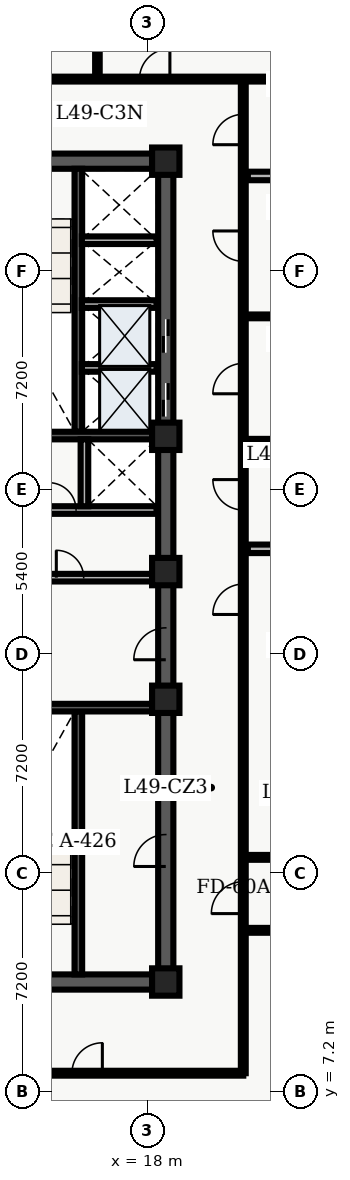
"""IFC4 building model, lengths in metres.
Left out: names, types, materials, properties, quantities, classifications, styles, units other than length and angle.
Written with IfcOpenShell. Run it as: python <this file> out.ifc"""

import sys

from ifc_helpers import new_model, entity, si_unit, converted_unit, direction, frame, origin_with_axes, origin_2d_with_axis, place, context, subcontext, project, spatial, polyline, rectangle, outline, extrude, element, fill, save


model = new_model("IFC4")
c1 = context("Model", 3, precision=1e-05, world=origin_with_axes(), true_north=direction((0.0, 1.0)))
c2 = subcontext(c1, "Body", "Model", "MODEL_VIEW")
j1 = project(units=[si_unit("LENGTHUNIT", "METRE"), converted_unit("PLANEANGLEUNIT", "DEGREE", entity("IfcPlaneAngleMeasure", 0.017), si_unit("PLANEANGLEUNIT", "RADIAN"), dimensions=[0, 0, 0, 0, 0, 0, 0])], contexts=[c1])
p1 = place(None, origin_with_axes())
s1 = spatial("IfcSite", under=j1, at=p1, CompositionType="ELEMENT")
p2 = place(p1, origin_with_axes())
s2 = spatial("IfcBuilding", under=s1, at=p2, CompositionType="ELEMENT")
p3 = place(p2, frame((0.0, 0.0, 200.4), z_axis=(0.0, 0.0, 1.0), x_axis=(1.0, 0.0, 0.0)))
s3 = spatial("IfcBuildingStorey", under=s2, at=p3, CompositionType="ELEMENT", Elevation=200.4)
p4 = place(p3, frame((11.4, 10.8, 0.0), z_axis=(0.0, 0.0, 1.0), x_axis=(1.0, 0.0, 0.0)))
e1 = element("IfcWall", 1, at=p4, inside=s3, PredefinedType="SHEAR", context=c2, shape_type="SweptSolid", body=[
    extrude(outline(polyline([(0.0, -0.25), (7.2, -0.25), (7.2, 0.25), (0.0, 0.25), (0.0, -0.25)])), origin_with_axes(), (0.0, 0.0, 1.0), 3.66),
])
p5 = place(p4, frame((2.625, 0.0, 0.0), z_axis=(0.0, 0.0, 1.0), x_axis=(1.0, 0.0, 0.0)))
e2 = element("IfcOpeningElement", 2, at=p5, cuts=e1, PredefinedType="OPENING", context=c2, shape_type="SweptSolid", body=[
    extrude(rectangle(XDim=1.05, YDim=0.52, at=origin_2d_with_axis()), origin_with_axes(), (0.0, 0.0, 1.0), 2.15),
])
p6 = place(p3, frame((11.4, 37.8, 0.0), z_axis=(0.0, 0.0, 1.0), x_axis=(1.0, 0.0, 0.0)))
e3 = element("IfcWall", 3, at=p6, inside=s3, PredefinedType="SHEAR", context=c2, shape_type="SweptSolid", body=[
    extrude(outline(polyline([(0.0, -0.25), (7.2, -0.25), (7.2, 0.25), (0.0, 0.25), (0.0, -0.25)])), origin_with_axes(), (0.0, 0.0, 1.0), 3.66),
])
p7 = place(p6, frame((2.625, 0.0, 0.0), z_axis=(0.0, 0.0, 1.0), x_axis=(1.0, 0.0, 0.0)))
e4 = element("IfcOpeningElement", 4, at=p7, cuts=e3, PredefinedType="OPENING", context=c2, shape_type="SweptSolid", body=[
    extrude(rectangle(XDim=1.05, YDim=0.52, at=origin_2d_with_axis()), origin_with_axes(), (0.0, 0.0, 1.0), 2.15),
])
p8 = place(p3, frame((18.6, 10.8, 0.0), z_axis=(0.0, 0.0, 1.0), x_axis=(0.0, 1.0, 0.0)))
e5 = element("IfcWall", 5, at=p8, inside=s3, PredefinedType="SHEAR", context=c2, shape_type="SweptSolid", body=[
    extrude(outline(polyline([(0.0, -0.25), (13.5, -0.25), (13.5, 0.25), (0.0, 0.25), (0.0, -0.25)])), origin_with_axes(), (0.0, 0.0, 1.0), 3.66),
])
p9 = place(p8, frame((11.125, 0.0, 0.0), z_axis=(0.0, 0.0, 1.0), x_axis=(1.0, 0.0, 0.0)))
e6 = element("IfcOpeningElement", 6, at=p9, cuts=e5, PredefinedType="OPENING", context=c2, shape_type="SweptSolid", body=[
    extrude(rectangle(XDim=1.05, YDim=0.52, at=origin_2d_with_axis()), origin_with_axes(), (0.0, 0.0, 1.0), 2.15),
])
p10 = place(p8, frame((4.325, 0.0, 0.0), z_axis=(0.0, 0.0, 1.0), x_axis=(1.0, 0.0, 0.0)))
e7 = element("IfcOpeningElement", 7, at=p10, cuts=e5, PredefinedType="OPENING", context=c2, shape_type="SweptSolid", body=[
    extrude(rectangle(XDim=1.05, YDim=0.52, at=origin_2d_with_axis()), origin_with_axes(), (0.0, 0.0, 1.0), 2.15),
])
p11 = place(p3, frame((18.6, 24.3, 0.0), z_axis=(0.0, 0.0, 1.0), x_axis=(0.0, 1.0, 0.0)))
e8 = element("IfcWall", 8, at=p11, inside=s3, PredefinedType="SHEAR", context=c2, shape_type="SweptSolid", body=[
    extrude(outline(polyline([(0.0, -0.25), (13.5, -0.25), (13.5, 0.25), (0.0, 0.25), (0.0, -0.25)])), origin_with_axes(), (0.0, 0.0, 1.0), 3.66),
])
p12 = place(p11, frame((5.65, 0.0, 0.0), z_axis=(0.0, 0.0, 1.0), x_axis=(1.0, 0.0, 0.0)))
e9 = element("IfcOpeningElement", 9, at=p12, cuts=e8, PredefinedType="OPENING", context=c2, shape_type="SweptSolid", body=[
    extrude(rectangle(XDim=1.1, YDim=0.52, at=origin_2d_with_axis()), origin_with_axes(), (0.0, 0.0, 1.0), 2.15),
])
p13 = place(p11, frame((7.75, 0.0, 0.0), z_axis=(0.0, 0.0, 1.0), x_axis=(1.0, 0.0, 0.0)))
e10 = element("IfcOpeningElement", 10, at=p13, cuts=e8, PredefinedType="OPENING", context=c2, shape_type="SweptSolid", body=[
    extrude(rectangle(XDim=1.1, YDim=0.52, at=origin_2d_with_axis()), origin_with_axes(), (0.0, 0.0, 1.0), 2.15),
])
p14 = place(p3, frame((15.725, 11.05, 0.0), z_axis=(0.0, 0.0, 1.0), x_axis=(0.0, 1.0, 0.0)))
e11 = element("IfcWall", 11, at=p14, inside=s3, PredefinedType="SHEAR", context=c2, shape_type="SweptSolid", body=[
    extrude(outline(polyline([(0.0, -0.125), (8.65, -0.125), (8.65, 0.125), (0.0, 0.125), (0.0, -0.125)])), origin_with_axes(), (0.0, 0.0, 1.0), 3.66),
])
p15 = place(p3, frame((11.65, 19.825, 0.0), z_axis=(0.0, 0.0, 1.0), x_axis=(1.0, 0.0, 0.0)))
e12 = element("IfcWall", 12, at=p15, inside=s3, PredefinedType="SHEAR", context=c2, shape_type="SweptSolid", body=[
    extrude(outline(polyline([(0.0, -0.125), (6.7, -0.125), (6.7, 0.125), (0.0, 0.125), (0.0, -0.125)])), origin_with_axes(), (0.0, 0.0, 1.0), 3.66),
])
p16 = place(p3, frame((15.725, 28.9, 0.0), z_axis=(0.0, 0.0, 1.0), x_axis=(0.0, 1.0, 0.0)))
e13 = element("IfcWall", 13, at=p16, inside=s3, PredefinedType="SHEAR", context=c2, shape_type="SweptSolid", body=[
    extrude(outline(polyline([(0.0, -0.125), (8.65, -0.125), (8.65, 0.125), (0.0, 0.125), (0.0, -0.125)])), origin_with_axes(), (0.0, 0.0, 1.0), 3.66),
])
p17 = place(p3, frame((11.65, 28.775, 0.0), z_axis=(0.0, 0.0, 1.0), x_axis=(1.0, 0.0, 0.0)))
e14 = element("IfcWall", 14, at=p17, inside=s3, PredefinedType="SHEAR", context=c2, shape_type="SweptSolid", body=[
    extrude(outline(polyline([(0.0, -0.125), (6.7, -0.125), (6.7, 0.125), (0.0, 0.125), (0.0, -0.125)])), origin_with_axes(), (0.0, 0.0, 1.0), 3.66),
])
p18 = place(p3, frame((11.7, 24.1, 0.0), z_axis=(0.0, 0.0, 1.0), x_axis=(1.0, 0.0, 0.0)))
e15 = element("IfcWall", 15, at=p18, inside=s3, PredefinedType="SOLIDWALL", context=c2, shape_type="SweptSolid", body=[
    extrude(outline(polyline([(0.0, -0.125), (6.6, -0.125), (6.6, 0.125), (0.0, 0.125), (0.0, -0.125)])), origin_with_axes(), (0.0, 0.0, 1.0), 2.7),
])
p19 = place(p18, frame((3.75, 0.0, 0.0), z_axis=(0.0, 0.0, 1.0), x_axis=(1.0, 0.0, 0.0)))
e16 = element("IfcOpeningElement", 16, at=p19, cuts=e15, PredefinedType="OPENING", context=c2, shape_type="SweptSolid", body=[
    extrude(rectangle(XDim=0.9, YDim=0.27, at=origin_2d_with_axis()), origin_with_axes(), (0.0, 0.0, 1.0), 2.15),
])
p20 = place(p3, frame((11.7, 26.325, 0.0), z_axis=(0.0, 0.0, 1.0), x_axis=(1.0, 0.0, 0.0)))
e17 = element("IfcWall", 17, at=p20, inside=s3, PredefinedType="SOLIDWALL", context=c2, shape_type="SweptSolid", body=[
    extrude(outline(polyline([(0.0, -0.125), (6.6, -0.125), (6.6, 0.125), (0.0, 0.125), (0.0, -0.125)])), origin_with_axes(), (0.0, 0.0, 1.0), 2.7),
])
p21 = place(p20, frame((3.5, 0.0, 0.0), z_axis=(0.0, 0.0, 1.0), x_axis=(1.0, 0.0, 0.0)))
e18 = element("IfcOpeningElement", 18, at=p21, cuts=e17, PredefinedType="OPENING", context=c2, shape_type="SweptSolid", body=[
    extrude(rectangle(XDim=0.9, YDim=0.27, at=origin_2d_with_axis()), origin_with_axes(), (0.0, 0.0, 1.0), 2.15),
])
p22 = place(p3, frame((15.925, 26.45, 0.0), z_axis=(0.0, 0.0, 1.0), x_axis=(0.0, 1.0, 0.0)))
e19 = element("IfcWall", 19, at=p22, inside=s3, PredefinedType="SOLIDWALL", context=c2, shape_type="SweptSolid", body=[
    extrude(outline(polyline([(0.0, -0.125), (2.2, -0.125), (2.2, 0.125), (0.0, 0.125), (0.0, -0.125)])), origin_with_axes(), (0.0, 0.0, 1.0), 2.7),
])
for number, where, z_axis, x_axis in (
    (20, (18.6, 10.8, 0.0), (0.0, 0.0, 1.0), (1.0, 0.0, 0.0)),
    (21, (18.6, 20.1, 0.0), (0.0, 0.0, 1.0), (1.0, 0.0, 0.0)),
    (22, (18.6, 24.3, 0.0), (0.0, 0.0, 1.0), (1.0, 0.0, 0.0)),
    (23, (18.6, 28.75, 0.0), (0.0, 0.0, 1.0), (1.0, 0.0, 0.0)),
    (24, (18.6, 37.8, 0.0), (0.0, 0.0, 1.0), (1.0, 0.0, 0.0)),
):
    element("IfcColumn", number, at=place(p3, frame(where, z_axis=z_axis, x_axis=x_axis)), inside=s3, PredefinedType="COLUMN", context=c2, shape_type="SweptSolid", body=[
        extrude(rectangle(XDim=0.9, YDim=0.9, at=origin_2d_with_axis()), origin_with_axes(), (0.0, 0.0, 1.0), 3.9),
    ])
for number, where, z_axis, x_axis in (
    (25, (15.84, 31.0, 0.0), (0.0, 0.0, 1.0), (1.0, 0.0, 0.0)),
    (26, (15.84, 33.1, 0.0), (0.0, 0.0, 1.0), (1.0, 0.0, 0.0)),
    (27, (15.84, 35.2, 0.0), (0.0, 0.0, 1.0), (1.0, 0.0, 0.0)),
):
    element("IfcWall", number, at=place(p3, frame(where, z_axis=z_axis, x_axis=x_axis)), inside=s3, PredefinedType="SOLIDWALL", context=c2, shape_type="SweptSolid", body=[
        extrude(outline(polyline([(0.0, -0.125), (2.46, -0.125), (2.46, 0.125), (0.0, 0.125), (0.0, -0.125)])), origin_with_axes(), (0.0, 0.0, 1.0), 2.7),
    ])
p23 = place(p3, frame((2.6, 7.8, 0.0), z_axis=(0.0, 0.0, 1.0), x_axis=(1.0, 0.0, 0.0)))
e28 = element("IfcWall", 28, at=p23, inside=s3, PredefinedType="PARTITIONING", context=c2, shape_type="SweptSolid", body=[
    extrude(outline(polyline([(0.0, -0.08), (18.55, -0.08), (18.55, 0.08), (0.0, 0.08), (0.0, -0.08)])), origin_with_axes(), (0.0, 0.0, 1.0), 2.7),
])
p24 = place(p23, frame((5.04, 0.0, 0.0), z_axis=(0.0, 0.0, 1.0), x_axis=(1.0, 0.0, 0.0)))
e29 = element("IfcOpeningElement", 29, at=p24, cuts=e28, PredefinedType="OPENING", context=c2, shape_type="SweptSolid", body=[
    extrude(rectangle(XDim=1.2, YDim=0.18, at=origin_2d_with_axis()), origin_with_axes(), (0.0, 0.0, 1.0), 2.2),
])
p25 = place(p23, frame((13.415, 0.0, 0.0), z_axis=(0.0, 0.0, 1.0), x_axis=(1.0, 0.0, 0.0)))
e30 = element("IfcOpeningElement", 30, at=p25, cuts=e28, PredefinedType="OPENING", context=c2, shape_type="SweptSolid", body=[
    extrude(rectangle(XDim=1.0, YDim=0.18, at=origin_2d_with_axis()), origin_with_axes(), (0.0, 0.0, 1.0), 2.15),
])
p26 = place(p3, frame((2.6, 40.5, 0.0), z_axis=(0.0, 0.0, 1.0), x_axis=(1.0, 0.0, 0.0)))
e31 = element("IfcWall", 31, at=p26, inside=s3, PredefinedType="PARTITIONING", context=c2, shape_type="SweptSolid", body=[
    extrude(outline(polyline([(0.0, -0.08), (26.177, -0.08), (26.177, 0.08), (0.0, 0.08), (0.0, -0.08)])), origin_with_axes(), (0.0, 0.0, 1.0), 2.7),
])
p27 = place(p26, frame((1.554, 0.0, 0.0), z_axis=(0.0, 0.0, 1.0), x_axis=(1.0, 0.0, 0.0)))
e32 = element("IfcOpeningElement", 32, at=p27, cuts=e31, PredefinedType="OPENING", context=c2, shape_type="SweptSolid", body=[
    extrude(rectangle(XDim=1.0, YDim=0.18, at=origin_2d_with_axis()), origin_with_axes(), (0.0, 0.0, 1.0), 2.15),
])
p28 = place(p26, frame((6.84, 0.0, 0.0), z_axis=(0.0, 0.0, 1.0), x_axis=(1.0, 0.0, 0.0)))
e33 = element("IfcOpeningElement", 33, at=p28, cuts=e31, PredefinedType="OPENING", context=c2, shape_type="SweptSolid", body=[
    extrude(rectangle(XDim=1.0, YDim=0.18, at=origin_2d_with_axis()), origin_with_axes(), (0.0, 0.0, 1.0), 2.15),
])
p29 = place(p26, frame((10.996, 0.0, 0.0), z_axis=(0.0, 0.0, 1.0), x_axis=(1.0, 0.0, 0.0)))
e34 = element("IfcOpeningElement", 34, at=p29, cuts=e31, PredefinedType="OPENING", context=c2, shape_type="SweptSolid", body=[
    extrude(rectangle(XDim=1.0, YDim=0.18, at=origin_2d_with_axis()), origin_with_axes(), (0.0, 0.0, 1.0), 2.15),
])
p30 = place(p26, frame((15.636, 0.0, 0.0), z_axis=(0.0, 0.0, 1.0), x_axis=(1.0, 0.0, 0.0)))
e35 = element("IfcOpeningElement", 35, at=p30, cuts=e31, PredefinedType="OPENING", context=c2, shape_type="SweptSolid", body=[
    extrude(rectangle(XDim=1.0, YDim=0.18, at=origin_2d_with_axis()), origin_with_axes(), (0.0, 0.0, 1.0), 2.15),
])
p31 = place(p3, frame((21.15, 7.8, 0.0), z_axis=(0.0, 0.0, 1.0), x_axis=(0.0, 1.0, 0.0)))
e36 = element("IfcWall", 36, at=p31, inside=s3, PredefinedType="PARTITIONING", context=c2, shape_type="SweptSolid", body=[
    extrude(outline(polyline([(0.0, -0.08), (32.7, -0.08), (32.7, 0.08), (0.0, 0.08), (0.0, -0.08)])), origin_with_axes(), (0.0, 0.0, 1.0), 2.7),
])
p32 = place(p31, frame((15.589, 0.0, 0.0), z_axis=(0.0, 0.0, 1.0), x_axis=(1.0, 0.0, 0.0)))
e37 = element("IfcOpeningElement", 37, at=p32, cuts=e36, PredefinedType="OPENING", context=c2, shape_type="SweptSolid", body=[
    extrude(rectangle(XDim=1.0, YDim=0.18, at=origin_2d_with_axis()), origin_with_axes(), (0.0, 0.0, 1.0), 2.15),
])
p33 = place(p31, frame((19.026, 0.0, 0.0), z_axis=(0.0, 0.0, 1.0), x_axis=(1.0, 0.0, 0.0)))
e38 = element("IfcOpeningElement", 38, at=p33, cuts=e36, PredefinedType="OPENING", context=c2, shape_type="SweptSolid", body=[
    extrude(rectangle(XDim=1.0, YDim=0.18, at=origin_2d_with_axis()), origin_with_axes(), (0.0, 0.0, 1.0), 2.15),
])
p34 = place(p31, frame((22.849, 0.0, 0.0), z_axis=(0.0, 0.0, 1.0), x_axis=(1.0, 0.0, 0.0)))
e39 = element("IfcOpeningElement", 39, at=p34, cuts=e36, PredefinedType="OPENING", context=c2, shape_type="SweptSolid", body=[
    extrude(rectangle(XDim=1.0, YDim=0.18, at=origin_2d_with_axis()), origin_with_axes(), (0.0, 0.0, 1.0), 2.15),
])
p35 = place(p31, frame((27.204, 0.0, 0.0), z_axis=(0.0, 0.0, 1.0), x_axis=(1.0, 0.0, 0.0)))
e40 = element("IfcOpeningElement", 40, at=p35, cuts=e36, PredefinedType="OPENING", context=c2, shape_type="SweptSolid", body=[
    extrude(rectangle(XDim=1.0, YDim=0.18, at=origin_2d_with_axis()), origin_with_axes(), (0.0, 0.0, 1.0), 2.15),
])
p36 = place(p31, frame((31.042, 0.0, 0.0), z_axis=(0.0, 0.0, 1.0), x_axis=(1.0, 0.0, 0.0)))
e41 = element("IfcOpeningElement", 41, at=p36, cuts=e36, PredefinedType="OPENING", context=c2, shape_type="SweptSolid", body=[
    extrude(rectangle(XDim=1.0, YDim=0.18, at=origin_2d_with_axis()), origin_with_axes(), (0.0, 0.0, 1.0), 2.15),
])
p37 = place(p31, frame((5.775, 0.0, 0.0), z_axis=(0.0, 0.0, 1.0), x_axis=(1.0, 0.0, 0.0)))
e42 = element("IfcOpeningElement", 42, at=p37, cuts=e36, PredefinedType="OPENING", context=c2, shape_type="SweptSolid", body=[
    extrude(rectangle(XDim=1.05, YDim=0.18, at=origin_2d_with_axis()), origin_with_axes(), (0.0, 0.0, 1.0), 2.15),
])
p38 = place(p3, frame((16.352, 40.6, 0.0), z_axis=(0.0, 0.0, 1.0), x_axis=(0.0, 1.0, 0.0)))
e43 = element("IfcWall", 43, at=p38, inside=s3, PredefinedType="PARTITIONING", context=c2, shape_type="SweptSolid", body=[
    extrude(outline(polyline([(0.0, -0.075), (7.665, -0.075), (7.665, 0.075), (0.0, 0.075), (0.0, -0.075)])), origin_with_axes(), (0.0, 0.0, 1.0), 2.7),
])
p39 = place(p3, frame((21.3, 25.049, 0.0), z_axis=(0.0, 0.0, 1.0), x_axis=(1.0, 0.0, 0.0)))
e44 = element("IfcWall", 44, at=p39, inside=s3, PredefinedType="PARTITIONING", context=c2, shape_type="SweptSolid", body=[
    extrude(outline(polyline([(0.0, -0.14), (7.477, -0.14), (7.477, 0.14), (0.0, 0.14), (0.0, -0.14)])), origin_with_axes(), (0.0, 0.0, 1.0), 2.7),
])
for number, where, z_axis, x_axis in (
    (45, (21.3, 28.603, 0.0), (0.0, 0.0, 1.0), (1.0, 0.0, 0.0)),
    (46, (21.3, 32.695, 0.0), (0.0, 0.0, 1.0), (1.0, 0.0, 0.0)),
):
    element("IfcWall", number, at=place(p3, frame(where, z_axis=z_axis, x_axis=x_axis)), inside=s3, PredefinedType="PARTITIONING", context=c2, shape_type="SweptSolid", body=[
        extrude(outline(polyline([(0.0, -0.062), (7.477, -0.062), (7.477, 0.062), (0.0, 0.062), (0.0, -0.062)])), origin_with_axes(), (0.0, 0.0, 1.0), 2.7),
    ])
p40 = place(p3, frame((21.3, 37.314, 0.0), z_axis=(0.0, 0.0, 1.0), x_axis=(1.0, 0.0, 0.0)))
e47 = element("IfcWall", 47, at=p40, inside=s3, PredefinedType="PARTITIONING", context=c2, shape_type="SweptSolid", body=[
    extrude(outline(polyline([(0.0, -0.14), (7.477, -0.14), (7.477, 0.14), (0.0, 0.14), (0.0, -0.14)])), origin_with_axes(), (0.0, 0.0, 1.0), 2.7),
])
p41 = place(p3, frame((21.15, 12.5, 0.0), z_axis=(0.0, 0.0, 1.0), x_axis=(1.0, 0.0, 0.0)))
e48 = element("IfcWall", 48, at=p41, inside=s3, PredefinedType="PARTITIONING", context=c2, shape_type="SweptSolid", body=[
    extrude(outline(polyline([(0.0, -0.08), (15.2, -0.08), (15.2, 0.08), (0.0, 0.08), (0.0, -0.08)])), origin_with_axes(), (0.0, 0.0, 1.0), 2.7),
])
p42 = place(p41, frame((1.758, 0.0, 0.0), z_axis=(0.0, 0.0, 1.0), x_axis=(1.0, 0.0, 0.0)))
e49 = element("IfcOpeningElement", 49, at=p42, cuts=e48, PredefinedType="OPENING", context=c2, shape_type="SweptSolid", body=[
    extrude(rectangle(XDim=1.0, YDim=0.18, at=origin_2d_with_axis()), origin_with_axes(), (0.0, 0.0, 1.0), 2.15),
])
p43 = place(p41, frame((4.893, 0.0, 0.0), z_axis=(0.0, 0.0, 1.0), x_axis=(1.0, 0.0, 0.0)))
e50 = element("IfcOpeningElement", 50, at=p43, cuts=e48, PredefinedType="OPENING", context=c2, shape_type="SweptSolid", body=[
    extrude(rectangle(XDim=1.0, YDim=0.18, at=origin_2d_with_axis()), origin_with_axes(), (0.0, 0.0, 1.0), 2.15),
])
p44 = place(p41, frame((8.555, 0.0, 0.0), z_axis=(0.0, 0.0, 1.0), x_axis=(1.0, 0.0, 0.0)))
e51 = element("IfcOpeningElement", 51, at=p44, cuts=e48, PredefinedType="OPENING", context=c2, shape_type="SweptSolid", body=[
    extrude(rectangle(XDim=1.0, YDim=0.18, at=origin_2d_with_axis()), origin_with_axes(), (0.0, 0.0, 1.0), 2.15),
])
p45 = place(p41, frame((12.889, 0.0, 0.0), z_axis=(0.0, 0.0, 1.0), x_axis=(1.0, 0.0, 0.0)))
e52 = element("IfcOpeningElement", 52, at=p45, cuts=e48, PredefinedType="OPENING", context=c2, shape_type="SweptSolid", body=[
    extrude(rectangle(XDim=1.0, YDim=0.18, at=origin_2d_with_axis()), origin_with_axes(), (0.0, 0.0, 1.0), 2.15),
])
p46 = place(p3, frame((21.15, 14.9, 0.0), z_axis=(0.0, 0.0, 1.0), x_axis=(1.0, 0.0, 0.0)))
e53 = element("IfcWall", 53, at=p46, inside=s3, PredefinedType="PARTITIONING", context=c2, shape_type="SweptSolid", body=[
    extrude(outline(polyline([(0.0, -0.08), (15.2, -0.08), (15.2, 0.08), (0.0, 0.08), (0.0, -0.08)])), origin_with_axes(), (0.0, 0.0, 1.0), 2.7),
])
p47 = place(p46, frame((7.65, 0.0, 0.0), z_axis=(0.0, 0.0, 1.0), x_axis=(1.0, 0.0, 0.0)))
e54 = element("IfcOpeningElement", 54, at=p47, cuts=e53, PredefinedType="OPENING", context=c2, shape_type="SweptSolid", body=[
    extrude(rectangle(XDim=1.0, YDim=0.18, at=origin_2d_with_axis()), origin_with_axes(), (0.0, 0.0, 1.0), 2.15),
])
p48 = place(p11, frame((5.65, 0.0, 0.0), z_axis=(0.0, 0.0, 1.0), x_axis=(1.0, 0.0, 0.0)))
e55 = element("IfcDoor", 55, at=p48, inside=s3, OperationType="SLIDING_TO_LEFT", PredefinedType="DOOR", context=c2, shape_type="SweptSolid", body=[
    extrude(rectangle(XDim=1.1, YDim=0.09, at=origin_2d_with_axis()), origin_with_axes(), (0.0, 0.0, 1.0), 2.15),
])
fill(e9, e55)
p49 = place(p11, frame((7.75, 0.0, 0.0), z_axis=(0.0, 0.0, 1.0), x_axis=(1.0, 0.0, 0.0)))
e56 = element("IfcDoor", 56, at=p49, inside=s3, OperationType="SLIDING_TO_RIGHT", PredefinedType="DOOR", context=c2, shape_type="SweptSolid", body=[
    extrude(rectangle(XDim=1.1, YDim=0.09, at=origin_2d_with_axis()), origin_with_axes(), (0.0, 0.0, 1.0), 2.15),
])
fill(e10, e56)
p50 = place(p8, frame((11.125, 0.0, 0.0), z_axis=(0.0, 0.0, 1.0), x_axis=(1.0, 0.0, 0.0)))
e57 = element("IfcDoor", 57, at=p50, inside=s3, OperationType="SINGLE_SWING_LEFT", PredefinedType="DOOR", context=c2, shape_type="SweptSolid", body=[
    extrude(rectangle(XDim=1.05, YDim=0.09, at=origin_2d_with_axis()), origin_with_axes(), (0.0, 0.0, 1.0), 2.15),
])
fill(e6, e57)
p51 = place(p18, frame((3.75, 0.0, 0.0), z_axis=(0.0, 0.0, 1.0), x_axis=(1.0, 0.0, 0.0)))
e58 = element("IfcDoor", 58, at=p51, inside=s3, OperationType="SINGLE_SWING_LEFT", PredefinedType="DOOR", context=c2, shape_type="SweptSolid", body=[
    extrude(rectangle(XDim=0.9, YDim=0.09, at=origin_2d_with_axis()), origin_with_axes(), (0.0, 0.0, 1.0), 2.15),
])
fill(e16, e58)
p52 = place(p20, frame((3.5, 0.0, 0.0), z_axis=(0.0, 0.0, 1.0), x_axis=(1.0, 0.0, 0.0)))
e59 = element("IfcDoor", 59, at=p52, inside=s3, OperationType="SINGLE_SWING_LEFT", PredefinedType="DOOR", context=c2, shape_type="SweptSolid", body=[
    extrude(rectangle(XDim=0.9, YDim=0.09, at=origin_2d_with_axis()), origin_with_axes(), (0.0, 0.0, 1.0), 2.15),
])
fill(e18, e59)
p53 = place(p8, frame((4.325, 0.0, 0.0), z_axis=(0.0, 0.0, 1.0), x_axis=(1.0, 0.0, 0.0)))
e60 = element("IfcDoor", 60, at=p53, inside=s3, OperationType="SINGLE_SWING_LEFT", PredefinedType="DOOR", context=c2, shape_type="SweptSolid", body=[
    extrude(rectangle(XDim=1.05, YDim=0.09, at=origin_2d_with_axis()), origin_with_axes(), (0.0, 0.0, 1.0), 2.15),
])
fill(e7, e60)
p54 = place(p23, frame((13.415, 0.0, 0.0), z_axis=(0.0, 0.0, 1.0), x_axis=(1.0, 0.0, 0.0)))
e61 = element("IfcDoor", 61, at=p54, inside=s3, OperationType="SINGLE_SWING_RIGHT", PredefinedType="DOOR", context=c2, shape_type="SweptSolid", body=[
    extrude(rectangle(XDim=1.0, YDim=0.09, at=origin_2d_with_axis()), origin_with_axes(), (0.0, 0.0, 1.0), 2.15),
])
fill(e30, e61)
p55 = place(p26, frame((15.636, 0.0, 0.0), z_axis=(0.0, 0.0, 1.0), x_axis=(1.0, 0.0, 0.0)))
e62 = element("IfcDoor", 62, at=p55, inside=s3, OperationType="SINGLE_SWING_RIGHT", PredefinedType="DOOR", context=c2, shape_type="SweptSolid", body=[
    extrude(rectangle(XDim=1.0, YDim=0.09, at=origin_2d_with_axis()), origin_with_axes(), (0.0, 0.0, 1.0), 2.15),
])
fill(e35, e62)
p56 = place(p31, frame((15.589, 0.0, 0.0), z_axis=(0.0, 0.0, 1.0), x_axis=(1.0, 0.0, 0.0)))
e63 = element("IfcDoor", 63, at=p56, inside=s3, OperationType="SINGLE_SWING_LEFT", PredefinedType="DOOR", context=c2, shape_type="SweptSolid", body=[
    extrude(rectangle(XDim=1.0, YDim=0.09, at=origin_2d_with_axis()), origin_with_axes(), (0.0, 0.0, 1.0), 2.15),
])
fill(e37, e63)
p57 = place(p31, frame((19.026, 0.0, 0.0), z_axis=(0.0, 0.0, 1.0), x_axis=(1.0, 0.0, 0.0)))
e64 = element("IfcDoor", 64, at=p57, inside=s3, OperationType="SINGLE_SWING_RIGHT", PredefinedType="DOOR", context=c2, shape_type="SweptSolid", body=[
    extrude(rectangle(XDim=1.0, YDim=0.09, at=origin_2d_with_axis()), origin_with_axes(), (0.0, 0.0, 1.0), 2.15),
])
fill(e38, e64)
p58 = place(p31, frame((22.849, 0.0, 0.0), z_axis=(0.0, 0.0, 1.0), x_axis=(1.0, 0.0, 0.0)))
e65 = element("IfcDoor", 65, at=p58, inside=s3, OperationType="SINGLE_SWING_LEFT", PredefinedType="DOOR", context=c2, shape_type="SweptSolid", body=[
    extrude(rectangle(XDim=1.0, YDim=0.09, at=origin_2d_with_axis()), origin_with_axes(), (0.0, 0.0, 1.0), 2.15),
])
fill(e39, e65)
p59 = place(p31, frame((27.204, 0.0, 0.0), z_axis=(0.0, 0.0, 1.0), x_axis=(1.0, 0.0, 0.0)))
e66 = element("IfcDoor", 66, at=p59, inside=s3, OperationType="SINGLE_SWING_RIGHT", PredefinedType="DOOR", context=c2, shape_type="SweptSolid", body=[
    extrude(rectangle(XDim=1.0, YDim=0.09, at=origin_2d_with_axis()), origin_with_axes(), (0.0, 0.0, 1.0), 2.15),
])
fill(e40, e66)
p60 = place(p31, frame((31.042, 0.0, 0.0), z_axis=(0.0, 0.0, 1.0), x_axis=(1.0, 0.0, 0.0)))
e67 = element("IfcDoor", 67, at=p60, inside=s3, OperationType="SINGLE_SWING_LEFT", PredefinedType="DOOR", context=c2, shape_type="SweptSolid", body=[
    extrude(rectangle(XDim=1.0, YDim=0.09, at=origin_2d_with_axis()), origin_with_axes(), (0.0, 0.0, 1.0), 2.15),
])
fill(e41, e67)
p61 = place(p31, frame((5.775, 0.0, 0.0), z_axis=(0.0, 0.0, 1.0), x_axis=(1.0, 0.0, 0.0)))
e68 = element("IfcDoor", 68, at=p61, inside=s3, OperationType="SINGLE_SWING_LEFT", PredefinedType="DOOR", context=c2, shape_type="SweptSolid", body=[
    extrude(rectangle(XDim=1.05, YDim=0.09, at=origin_2d_with_axis()), origin_with_axes(), (0.0, 0.0, 1.0), 2.15),
])
fill(e42, e68)
save(model, sys.argv[1])
